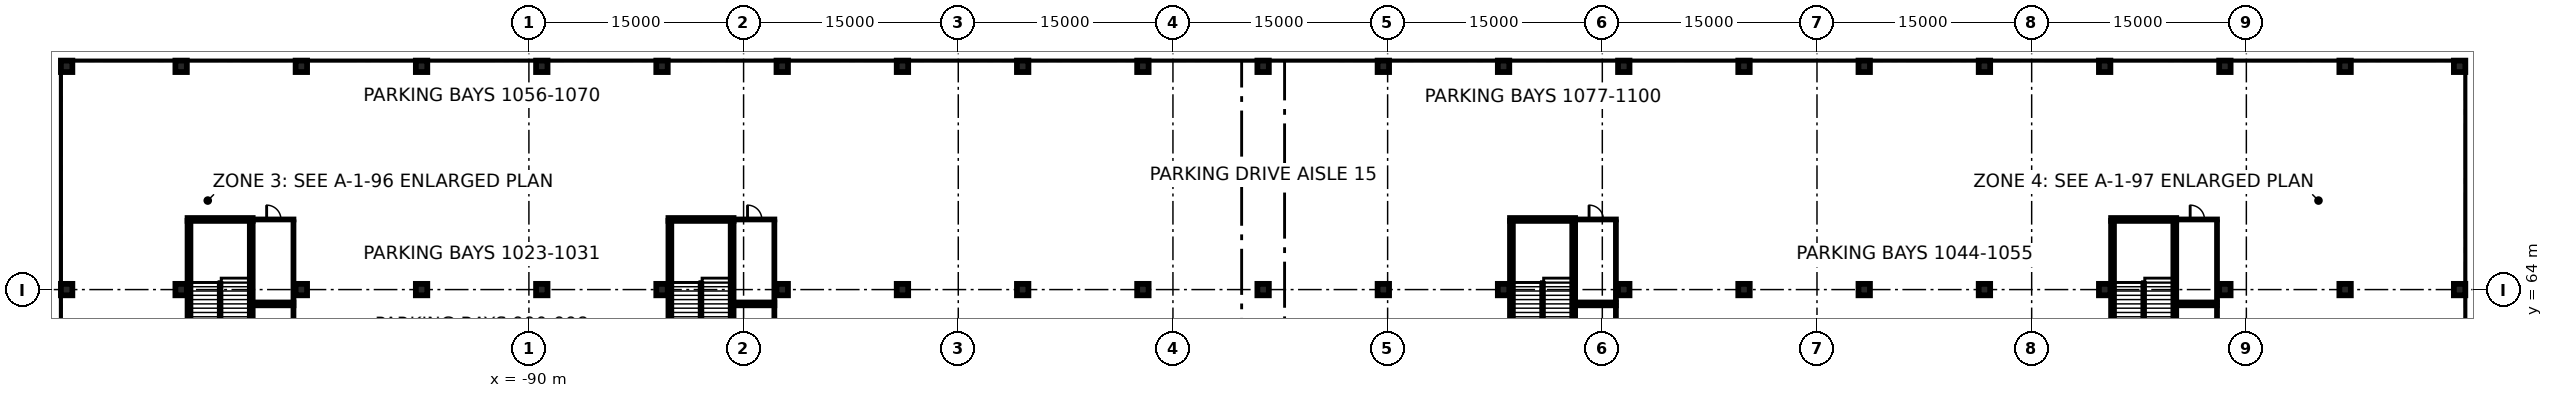
"""IFC4 building model, lengths in metres.
Left out: names, types, materials, properties, quantities, classifications, styles, units other than length and angle.
Written with IfcOpenShell. Run it as: python <this file> out.ifc"""

import sys

from ifc_helpers import new_model, si_unit, direction, frame, frame_2d, origin, origin_2d, place, context, subcontext, project, spatial, rectangle, extrude, element, fill, save


model = new_model("IFC4")
c1 = context("Model", 3, precision=1e-05, world=origin(), true_north=direction((0.0, 1.0)))
c2 = subcontext(c1, "Body", "Model", "MODEL_VIEW")
j1 = project(units=[si_unit("LENGTHUNIT", "METRE"), si_unit("PLANEANGLEUNIT", "RADIAN")], contexts=[c1])
p1 = place(None, origin())
s1 = spatial("IfcSite", under=j1, at=p1, CompositionType="ELEMENT")
p2 = place(p1, origin())
s2 = spatial("IfcBuilding", under=s1, at=p2, CompositionType="ELEMENT")
p3 = place(p2, frame((0.0, 0.0, -12.0)))
s3 = spatial("IfcBuildingStorey", under=s2, at=p3, CompositionType="ELEMENT", Elevation=-12.0)
p4 = place(p3, frame((-123.6, 80.45, 0.0), z_axis=(0.0, 0.0, 1.0), x_axis=(1.0, 0.0, 0.0)))
e1 = element("IfcWall", 1, at=p4, inside=s3, PredefinedType="USERDEFINED", context=c2, shape_type="SweptSolid", body=[
    extrude(rectangle(XDim=169.8, YDim=0.9, at=frame_2d((84.9, 0.0))), origin(), (0.0, 0.0, 1.0), 11.55),
])
for number, where, z_axis, x_axis in (
    (2, (-123.15, -80.0, 0.0), (0.0, 0.0, 1.0), (0.0, 1.0, 0.0)),
    (3, (45.75, -80.0, 0.0), (0.0, 0.0, 1.0), (0.0, 1.0, 0.0)),
):
    element("IfcWall", number, at=place(p3, frame(where, z_axis=z_axis, x_axis=x_axis)), inside=s3, PredefinedType="USERDEFINED", context=c2, shape_type="SweptSolid", body=[
        extrude(rectangle(XDim=160.0, YDim=0.9, at=frame_2d((80.0, 0.0))), origin(), (0.0, 0.0, 1.0), 11.55),
    ])
p5 = place(p2, frame((0.0, 0.0, -7.2)))
s4 = spatial("IfcBuildingStorey", under=s2, at=p5, CompositionType="ELEMENT", Elevation=-7.2)
for number, where, z_axis, x_axis in (
    (4, (-122.3, 64.0, -0.4), (0.0, 0.0, 1.0), (1.0, 0.0, 0.0)),
    (5, (-122.3, 79.6, -0.4), (0.0, 0.0, 1.0), (1.0, 0.0, 0.0)),
    (6, (-114.3, 64.0, -0.4), (0.0, 0.0, 1.0), (1.0, 0.0, 0.0)),
    (7, (-114.3, 79.6, -0.4), (0.0, 0.0, 1.0), (1.0, 0.0, 0.0)),
    (8, (-105.9, 64.0, -0.4), (0.0, 0.0, 1.0), (1.0, 0.0, 0.0)),
    (9, (-105.9, 79.6, -0.4), (0.0, 0.0, 1.0), (1.0, 0.0, 0.0)),
    (10, (-97.5, 64.0, -0.4), (0.0, 0.0, 1.0), (1.0, 0.0, 0.0)),
    (11, (-97.5, 79.6, -0.4), (0.0, 0.0, 1.0), (1.0, 0.0, 0.0)),
    (12, (-89.1, 64.0, -0.4), (0.0, 0.0, 1.0), (1.0, 0.0, 0.0)),
    (13, (-89.1, 79.6, -0.4), (0.0, 0.0, 1.0), (1.0, 0.0, 0.0)),
    (14, (-80.7, 64.0, -0.4), (0.0, 0.0, 1.0), (1.0, 0.0, 0.0)),
    (15, (-80.7, 79.6, -0.4), (0.0, 0.0, 1.0), (1.0, 0.0, 0.0)),
    (16, (-72.3, 64.0, -0.4), (0.0, 0.0, 1.0), (1.0, 0.0, 0.0)),
    (17, (-72.3, 79.6, -0.4), (0.0, 0.0, 1.0), (1.0, 0.0, 0.0)),
    (18, (-63.9, 64.0, -0.4), (0.0, 0.0, 1.0), (1.0, 0.0, 0.0)),
    (19, (-63.9, 79.6, -0.4), (0.0, 0.0, 1.0), (1.0, 0.0, 0.0)),
    (20, (-55.5, 64.0, -0.4), (0.0, 0.0, 1.0), (1.0, 0.0, 0.0)),
    (21, (-55.5, 79.6, -0.4), (0.0, 0.0, 1.0), (1.0, 0.0, 0.0)),
    (22, (-47.1, 64.0, -0.4), (0.0, 0.0, 1.0), (1.0, 0.0, 0.0)),
    (23, (-47.1, 79.6, -0.4), (0.0, 0.0, 1.0), (1.0, 0.0, 0.0)),
    (24, (-38.7, 64.0, -0.4), (0.0, 0.0, 1.0), (1.0, 0.0, 0.0)),
    (25, (-38.7, 79.6, -0.4), (0.0, 0.0, 1.0), (1.0, 0.0, 0.0)),
    (26, (-30.3, 64.0, -0.4), (0.0, 0.0, 1.0), (1.0, 0.0, 0.0)),
    (27, (-30.3, 79.6, -0.4), (0.0, 0.0, 1.0), (1.0, 0.0, 0.0)),
    (28, (-21.9, 64.0, -0.4), (0.0, 0.0, 1.0), (1.0, 0.0, 0.0)),
    (29, (-21.9, 79.6, -0.4), (0.0, 0.0, 1.0), (1.0, 0.0, 0.0)),
    (30, (-13.5, 64.0, -0.4), (0.0, 0.0, 1.0), (1.0, 0.0, 0.0)),
    (31, (-13.5, 79.6, -0.4), (0.0, 0.0, 1.0), (1.0, 0.0, 0.0)),
    (32, (-5.1, 64.0, -0.4), (0.0, 0.0, 1.0), (1.0, 0.0, 0.0)),
    (33, (-5.1, 79.6, -0.4), (0.0, 0.0, 1.0), (1.0, 0.0, 0.0)),
    (34, (3.3, 64.0, -0.4), (0.0, 0.0, 1.0), (1.0, 0.0, 0.0)),
    (35, (3.3, 79.6, -0.4), (0.0, 0.0, 1.0), (1.0, 0.0, 0.0)),
    (36, (11.7, 64.0, -0.4), (0.0, 0.0, 1.0), (1.0, 0.0, 0.0)),
    (37, (11.7, 79.6, -0.4), (0.0, 0.0, 1.0), (1.0, 0.0, 0.0)),
    (38, (20.1, 64.0, -0.4), (0.0, 0.0, 1.0), (1.0, 0.0, 0.0)),
    (39, (20.1, 79.6, -0.4), (0.0, 0.0, 1.0), (1.0, 0.0, 0.0)),
    (40, (28.5, 64.0, -0.4), (0.0, 0.0, 1.0), (1.0, 0.0, 0.0)),
    (41, (28.5, 79.6, -0.4), (0.0, 0.0, 1.0), (1.0, 0.0, 0.0)),
    (42, (36.9, 64.0, -0.4), (0.0, 0.0, 1.0), (1.0, 0.0, 0.0)),
    (43, (36.9, 79.6, -0.4), (0.0, 0.0, 1.0), (1.0, 0.0, 0.0)),
    (44, (44.9, 64.0, -0.4), (0.0, 0.0, 1.0), (1.0, 0.0, 0.0)),
    (45, (44.9, 79.6, -0.4), (0.0, 0.0, 1.0), (1.0, 0.0, 0.0)),
):
    element("IfcColumn", number, at=place(p5, frame(where, z_axis=z_axis, x_axis=x_axis)), inside=s4, PredefinedType="COLUMN", context=c2, shape_type="SweptSolid", body=[
        extrude(rectangle(XDim=0.8, YDim=0.8, at=origin_2d()), origin(), (0.0, 0.0, 1.0), 3.6),
    ])
p6 = place(p5, frame((-109.3, 62.9, 0.0), z_axis=(0.0, 0.0, 1.0), x_axis=(1.0, 0.0, 0.0)))
e46 = element("IfcWall", 46, at=p6, inside=s4, PredefinedType="PARTITIONING", context=c2, shape_type="SweptSolid", body=[
    extrude(rectangle(XDim=2.95, YDim=0.2, at=frame_2d((1.475, 0.0))), origin(), (0.0, 0.0, 1.0), 3.2),
])
p7 = place(p5, frame((-106.45, 59.2, 0.0), z_axis=(0.0, 0.0, 1.0), x_axis=(0.0, 1.0, 0.0)))
e47 = element("IfcWall", 47, at=p7, inside=s4, PredefinedType="PARTITIONING", context=c2, shape_type="SweptSolid", body=[
    extrude(rectangle(XDim=3.6, YDim=0.2, at=frame_2d((1.8, 0.0))), origin(), (0.0, 0.0, 1.0), 3.2),
])
p8 = place(p5, frame((-109.3, 63.1, 0.0), z_axis=(0.0, 0.0, 1.0), x_axis=(1.0, 0.0, 0.0)))
e48 = element("IfcWall", 48, at=p8, inside=s4, PredefinedType="PARTITIONING", context=c2, shape_type="SweptSolid", body=[
    extrude(rectangle(XDim=2.95, YDim=0.2, at=frame_2d((1.475, 0.0))), origin(), (0.0, 0.0, 1.0), 3.2),
])
p9 = place(p5, frame((-109.3, 68.9, 0.0), z_axis=(0.0, 0.0, 1.0), x_axis=(1.0, 0.0, 0.0)))
e49 = element("IfcWall", 49, at=p9, inside=s4, PredefinedType="PARTITIONING", context=c2, shape_type="SweptSolid", body=[
    extrude(rectangle(XDim=2.95, YDim=0.2, at=frame_2d((1.475, 0.0))), origin(), (0.0, 0.0, 1.0), 3.2),
])
p10 = place(p9, frame((0.975, 0.0, 0.0)))
e50 = element("IfcOpeningElement", 50, at=p10, cuts=e49, PredefinedType="OPENING", context=c2, shape_type="SweptSolid", body=[
    extrude(rectangle(XDim=1.0, YDim=2.1, at=frame_2d((0.5, 1.05))), frame((0.0, 0.11, 0.0), z_axis=(0.0, -1.0, 0.0), x_axis=(1.0, 0.0, 0.0)), (0.0, 0.0, 1.0), 0.22),
])
p11 = place(p5, frame((-106.45, 63.2, 0.0), z_axis=(0.0, 0.0, 1.0), x_axis=(0.0, 1.0, 0.0)))
e51 = element("IfcWall", 51, at=p11, inside=s4, PredefinedType="PARTITIONING", context=c2, shape_type="SweptSolid", body=[
    extrude(rectangle(XDim=5.6, YDim=0.2, at=frame_2d((2.8, 0.0))), origin(), (0.0, 0.0, 1.0), 3.2),
])
p12 = place(p5, frame((-75.7, 62.9, 0.0), z_axis=(0.0, 0.0, 1.0), x_axis=(1.0, 0.0, 0.0)))
e52 = element("IfcWall", 52, at=p12, inside=s4, PredefinedType="PARTITIONING", context=c2, shape_type="SweptSolid", body=[
    extrude(rectangle(XDim=2.95, YDim=0.2, at=frame_2d((1.475, 0.0))), origin(), (0.0, 0.0, 1.0), 3.2),
])
p13 = place(p5, frame((-72.85, 59.2, 0.0), z_axis=(0.0, 0.0, 1.0), x_axis=(0.0, 1.0, 0.0)))
e53 = element("IfcWall", 53, at=p13, inside=s4, PredefinedType="PARTITIONING", context=c2, shape_type="SweptSolid", body=[
    extrude(rectangle(XDim=3.6, YDim=0.2, at=frame_2d((1.8, 0.0))), origin(), (0.0, 0.0, 1.0), 3.2),
])
p14 = place(p5, frame((-75.7, 63.1, 0.0), z_axis=(0.0, 0.0, 1.0), x_axis=(1.0, 0.0, 0.0)))
e54 = element("IfcWall", 54, at=p14, inside=s4, PredefinedType="PARTITIONING", context=c2, shape_type="SweptSolid", body=[
    extrude(rectangle(XDim=2.95, YDim=0.2, at=frame_2d((1.475, 0.0))), origin(), (0.0, 0.0, 1.0), 3.2),
])
p15 = place(p5, frame((-75.7, 68.9, 0.0), z_axis=(0.0, 0.0, 1.0), x_axis=(1.0, 0.0, 0.0)))
e55 = element("IfcWall", 55, at=p15, inside=s4, PredefinedType="PARTITIONING", context=c2, shape_type="SweptSolid", body=[
    extrude(rectangle(XDim=2.95, YDim=0.2, at=frame_2d((1.475, 0.0))), origin(), (0.0, 0.0, 1.0), 3.2),
])
p16 = place(p15, frame((0.975, 0.0, 0.0)))
e56 = element("IfcOpeningElement", 56, at=p16, cuts=e55, PredefinedType="OPENING", context=c2, shape_type="SweptSolid", body=[
    extrude(rectangle(XDim=1.0, YDim=2.1, at=frame_2d((0.5, 1.05))), frame((0.0, 0.11, 0.0), z_axis=(0.0, -1.0, 0.0), x_axis=(1.0, 0.0, 0.0)), (0.0, 0.0, 1.0), 0.22),
])
p17 = place(p5, frame((-72.85, 63.2, 0.0), z_axis=(0.0, 0.0, 1.0), x_axis=(0.0, 1.0, 0.0)))
e57 = element("IfcWall", 57, at=p17, inside=s4, PredefinedType="PARTITIONING", context=c2, shape_type="SweptSolid", body=[
    extrude(rectangle(XDim=5.6, YDim=0.2, at=frame_2d((2.8, 0.0))), origin(), (0.0, 0.0, 1.0), 3.2),
])
p18 = place(p5, frame((-16.9, 62.9, 0.0), z_axis=(0.0, 0.0, 1.0), x_axis=(1.0, 0.0, 0.0)))
e58 = element("IfcWall", 58, at=p18, inside=s4, PredefinedType="PARTITIONING", context=c2, shape_type="SweptSolid", body=[
    extrude(rectangle(XDim=2.95, YDim=0.2, at=frame_2d((1.475, 0.0))), origin(), (0.0, 0.0, 1.0), 3.2),
])
p19 = place(p5, frame((-14.05, 59.2, 0.0), z_axis=(0.0, 0.0, 1.0), x_axis=(0.0, 1.0, 0.0)))
e59 = element("IfcWall", 59, at=p19, inside=s4, PredefinedType="PARTITIONING", context=c2, shape_type="SweptSolid", body=[
    extrude(rectangle(XDim=3.6, YDim=0.2, at=frame_2d((1.8, 0.0))), origin(), (0.0, 0.0, 1.0), 3.2),
])
p20 = place(p5, frame((-16.9, 63.1, 0.0), z_axis=(0.0, 0.0, 1.0), x_axis=(1.0, 0.0, 0.0)))
e60 = element("IfcWall", 60, at=p20, inside=s4, PredefinedType="PARTITIONING", context=c2, shape_type="SweptSolid", body=[
    extrude(rectangle(XDim=2.95, YDim=0.2, at=frame_2d((1.475, 0.0))), origin(), (0.0, 0.0, 1.0), 3.2),
])
p21 = place(p5, frame((-16.9, 68.9, 0.0), z_axis=(0.0, 0.0, 1.0), x_axis=(1.0, 0.0, 0.0)))
e61 = element("IfcWall", 61, at=p21, inside=s4, PredefinedType="PARTITIONING", context=c2, shape_type="SweptSolid", body=[
    extrude(rectangle(XDim=2.95, YDim=0.2, at=frame_2d((1.475, 0.0))), origin(), (0.0, 0.0, 1.0), 3.2),
])
p22 = place(p21, frame((0.975, 0.0, 0.0)))
e62 = element("IfcOpeningElement", 62, at=p22, cuts=e61, PredefinedType="OPENING", context=c2, shape_type="SweptSolid", body=[
    extrude(rectangle(XDim=1.0, YDim=2.1, at=frame_2d((0.5, 1.05))), frame((0.0, 0.11, 0.0), z_axis=(0.0, -1.0, 0.0), x_axis=(1.0, 0.0, 0.0)), (0.0, 0.0, 1.0), 0.22),
])
p23 = place(p5, frame((-14.05, 63.2, 0.0), z_axis=(0.0, 0.0, 1.0), x_axis=(0.0, 1.0, 0.0)))
e63 = element("IfcWall", 63, at=p23, inside=s4, PredefinedType="PARTITIONING", context=c2, shape_type="SweptSolid", body=[
    extrude(rectangle(XDim=5.6, YDim=0.2, at=frame_2d((2.8, 0.0))), origin(), (0.0, 0.0, 1.0), 3.2),
])
p24 = place(p5, frame((25.1, 62.9, 0.0), z_axis=(0.0, 0.0, 1.0), x_axis=(1.0, 0.0, 0.0)))
e64 = element("IfcWall", 64, at=p24, inside=s4, PredefinedType="PARTITIONING", context=c2, shape_type="SweptSolid", body=[
    extrude(rectangle(XDim=2.95, YDim=0.2, at=frame_2d((1.475, 0.0))), origin(), (0.0, 0.0, 1.0), 3.2),
])
p25 = place(p5, frame((27.95, 59.2, 0.0), z_axis=(0.0, 0.0, 1.0), x_axis=(0.0, 1.0, 0.0)))
e65 = element("IfcWall", 65, at=p25, inside=s4, PredefinedType="PARTITIONING", context=c2, shape_type="SweptSolid", body=[
    extrude(rectangle(XDim=3.6, YDim=0.2, at=frame_2d((1.8, 0.0))), origin(), (0.0, 0.0, 1.0), 3.2),
])
p26 = place(p5, frame((25.1, 63.1, 0.0), z_axis=(0.0, 0.0, 1.0), x_axis=(1.0, 0.0, 0.0)))
e66 = element("IfcWall", 66, at=p26, inside=s4, PredefinedType="PARTITIONING", context=c2, shape_type="SweptSolid", body=[
    extrude(rectangle(XDim=2.95, YDim=0.2, at=frame_2d((1.475, 0.0))), origin(), (0.0, 0.0, 1.0), 3.2),
])
p27 = place(p5, frame((25.1, 68.9, 0.0), z_axis=(0.0, 0.0, 1.0), x_axis=(1.0, 0.0, 0.0)))
e67 = element("IfcWall", 67, at=p27, inside=s4, PredefinedType="PARTITIONING", context=c2, shape_type="SweptSolid", body=[
    extrude(rectangle(XDim=2.95, YDim=0.2, at=frame_2d((1.475, 0.0))), origin(), (0.0, 0.0, 1.0), 3.2),
])
p28 = place(p27, frame((0.975, 0.0, 0.0)))
e68 = element("IfcOpeningElement", 68, at=p28, cuts=e67, PredefinedType="OPENING", context=c2, shape_type="SweptSolid", body=[
    extrude(rectangle(XDim=1.0, YDim=2.1, at=frame_2d((0.5, 1.05))), frame((0.0, 0.11, 0.0), z_axis=(0.0, -1.0, 0.0), x_axis=(1.0, 0.0, 0.0)), (0.0, 0.0, 1.0), 0.22),
])
p29 = place(p5, frame((27.95, 63.2, 0.0), z_axis=(0.0, 0.0, 1.0), x_axis=(0.0, 1.0, 0.0)))
e69 = element("IfcWall", 69, at=p29, inside=s4, PredefinedType="PARTITIONING", context=c2, shape_type="SweptSolid", body=[
    extrude(rectangle(XDim=5.6, YDim=0.2, at=frame_2d((2.8, 0.0))), origin(), (0.0, 0.0, 1.0), 3.2),
])
p30 = place(p5, frame((-113.75, 59.2, 0.0), z_axis=(0.0, 0.0, 1.0), x_axis=(0.0, 1.0, 0.0)))
e70 = element("IfcWall", 70, at=p30, inside=s4, PredefinedType="SOLIDWALL", context=c2, shape_type="SweptSolid", body=[
    extrude(rectangle(XDim=9.6, YDim=0.2, at=frame_2d((4.8, 0.0))), origin(), (0.0, 0.0, 1.0), 3.2),
])
p31 = place(p5, frame((-109.4, 59.2, 0.0), z_axis=(0.0, 0.0, 1.0), x_axis=(0.0, 1.0, 0.0)))
e71 = element("IfcWall", 71, at=p31, inside=s4, PredefinedType="SOLIDWALL", context=c2, shape_type="SweptSolid", body=[
    extrude(rectangle(XDim=9.6, YDim=0.2, at=frame_2d((4.8, 0.0))), origin(), (0.0, 0.0, 1.0), 3.2),
])
p32 = place(p31, frame((0.4, 0.0, 0.0)))
e72 = element("IfcOpeningElement", 72, at=p32, cuts=e71, PredefinedType="OPENING", context=c2, shape_type="SweptSolid", body=[
    extrude(rectangle(XDim=1.2, YDim=2.1, at=frame_2d((0.6, 1.05))), frame((0.0, 0.11, 0.0), z_axis=(0.0, -1.0, 0.0), x_axis=(1.0, 0.0, 0.0)), (0.0, 0.0, 1.0), 0.22),
])
p33 = place(p5, frame((-113.85, 68.9, 0.0), z_axis=(0.0, 0.0, 1.0), x_axis=(1.0, 0.0, 0.0)))
e73 = element("IfcWall", 73, at=p33, inside=s4, PredefinedType="SOLIDWALL", context=c2, shape_type="SweptSolid", body=[
    extrude(rectangle(XDim=4.55, YDim=0.2, at=frame_2d((2.275, 0.0))), origin(), (0.0, 0.0, 1.0), 3.2),
])
p34 = place(p5, frame((-80.15, 59.2, 0.0), z_axis=(0.0, 0.0, 1.0), x_axis=(0.0, 1.0, 0.0)))
e74 = element("IfcWall", 74, at=p34, inside=s4, PredefinedType="SOLIDWALL", context=c2, shape_type="SweptSolid", body=[
    extrude(rectangle(XDim=9.6, YDim=0.2, at=frame_2d((4.8, 0.0))), origin(), (0.0, 0.0, 1.0), 3.2),
])
p35 = place(p5, frame((-75.8, 59.2, 0.0), z_axis=(0.0, 0.0, 1.0), x_axis=(0.0, 1.0, 0.0)))
e75 = element("IfcWall", 75, at=p35, inside=s4, PredefinedType="SOLIDWALL", context=c2, shape_type="SweptSolid", body=[
    extrude(rectangle(XDim=9.6, YDim=0.2, at=frame_2d((4.8, 0.0))), origin(), (0.0, 0.0, 1.0), 3.2),
])
p36 = place(p35, frame((0.4, 0.0, 0.0)))
e76 = element("IfcOpeningElement", 76, at=p36, cuts=e75, PredefinedType="OPENING", context=c2, shape_type="SweptSolid", body=[
    extrude(rectangle(XDim=1.2, YDim=2.1, at=frame_2d((0.6, 1.05))), frame((0.0, 0.11, 0.0), z_axis=(0.0, -1.0, 0.0), x_axis=(1.0, 0.0, 0.0)), (0.0, 0.0, 1.0), 0.22),
])
p37 = place(p5, frame((-80.25, 68.9, 0.0), z_axis=(0.0, 0.0, 1.0), x_axis=(1.0, 0.0, 0.0)))
e77 = element("IfcWall", 77, at=p37, inside=s4, PredefinedType="SOLIDWALL", context=c2, shape_type="SweptSolid", body=[
    extrude(rectangle(XDim=4.55, YDim=0.2, at=frame_2d((2.275, 0.0))), origin(), (0.0, 0.0, 1.0), 3.2),
])
p38 = place(p5, frame((-21.35, 59.2, 0.0), z_axis=(0.0, 0.0, 1.0), x_axis=(0.0, 1.0, 0.0)))
e78 = element("IfcWall", 78, at=p38, inside=s4, PredefinedType="SOLIDWALL", context=c2, shape_type="SweptSolid", body=[
    extrude(rectangle(XDim=9.6, YDim=0.2, at=frame_2d((4.8, 0.0))), origin(), (0.0, 0.0, 1.0), 3.2),
])
p39 = place(p5, frame((-17.0, 59.2, 0.0), z_axis=(0.0, 0.0, 1.0), x_axis=(0.0, 1.0, 0.0)))
e79 = element("IfcWall", 79, at=p39, inside=s4, PredefinedType="SOLIDWALL", context=c2, shape_type="SweptSolid", body=[
    extrude(rectangle(XDim=9.6, YDim=0.2, at=frame_2d((4.8, 0.0))), origin(), (0.0, 0.0, 1.0), 3.2),
])
p40 = place(p39, frame((0.4, 0.0, 0.0)))
e80 = element("IfcOpeningElement", 80, at=p40, cuts=e79, PredefinedType="OPENING", context=c2, shape_type="SweptSolid", body=[
    extrude(rectangle(XDim=1.2, YDim=2.1, at=frame_2d((0.6, 1.05))), frame((0.0, 0.11, 0.0), z_axis=(0.0, -1.0, 0.0), x_axis=(1.0, 0.0, 0.0)), (0.0, 0.0, 1.0), 0.22),
])
p41 = place(p5, frame((-21.45, 68.9, 0.0), z_axis=(0.0, 0.0, 1.0), x_axis=(1.0, 0.0, 0.0)))
e81 = element("IfcWall", 81, at=p41, inside=s4, PredefinedType="SOLIDWALL", context=c2, shape_type="SweptSolid", body=[
    extrude(rectangle(XDim=4.55, YDim=0.2, at=frame_2d((2.275, 0.0))), origin(), (0.0, 0.0, 1.0), 3.2),
])
p42 = place(p5, frame((20.65, 59.2, 0.0), z_axis=(0.0, 0.0, 1.0), x_axis=(0.0, 1.0, 0.0)))
e82 = element("IfcWall", 82, at=p42, inside=s4, PredefinedType="SOLIDWALL", context=c2, shape_type="SweptSolid", body=[
    extrude(rectangle(XDim=9.6, YDim=0.2, at=frame_2d((4.8, 0.0))), origin(), (0.0, 0.0, 1.0), 3.2),
])
p43 = place(p5, frame((25.0, 59.2, 0.0), z_axis=(0.0, 0.0, 1.0), x_axis=(0.0, 1.0, 0.0)))
e83 = element("IfcWall", 83, at=p43, inside=s4, PredefinedType="SOLIDWALL", context=c2, shape_type="SweptSolid", body=[
    extrude(rectangle(XDim=9.6, YDim=0.2, at=frame_2d((4.8, 0.0))), origin(), (0.0, 0.0, 1.0), 3.2),
])
p44 = place(p43, frame((0.4, 0.0, 0.0)))
e84 = element("IfcOpeningElement", 84, at=p44, cuts=e83, PredefinedType="OPENING", context=c2, shape_type="SweptSolid", body=[
    extrude(rectangle(XDim=1.2, YDim=2.1, at=frame_2d((0.6, 1.05))), frame((0.0, 0.11, 0.0), z_axis=(0.0, -1.0, 0.0), x_axis=(1.0, 0.0, 0.0)), (0.0, 0.0, 1.0), 0.22),
])
p45 = place(p5, frame((20.55, 68.9, 0.0), z_axis=(0.0, 0.0, 1.0), x_axis=(1.0, 0.0, 0.0)))
e85 = element("IfcWall", 85, at=p45, inside=s4, PredefinedType="SOLIDWALL", context=c2, shape_type="SweptSolid", body=[
    extrude(rectangle(XDim=4.55, YDim=0.2, at=frame_2d((2.275, 0.0))), origin(), (0.0, 0.0, 1.0), 3.2),
])
p46 = place(p10, origin())
e86 = element("IfcDoor", 86, at=p46, inside=s4, OperationType="SINGLE_SWING_LEFT", PredefinedType="DOOR", context=c2, shape_type="SweptSolid", body=[
    extrude(rectangle(XDim=1.0, YDim=2.1, at=frame_2d((0.5, 1.05))), frame((0.0, 0.025, 0.0), z_axis=(0.0, -1.0, 0.0), x_axis=(1.0, 0.0, 0.0)), (0.0, 0.0, 1.0), 0.05),
])
fill(e50, e86)
p47 = place(p16, origin())
e87 = element("IfcDoor", 87, at=p47, inside=s4, OperationType="SINGLE_SWING_LEFT", PredefinedType="DOOR", context=c2, shape_type="SweptSolid", body=[
    extrude(rectangle(XDim=1.0, YDim=2.1, at=frame_2d((0.5, 1.05))), frame((0.0, 0.025, 0.0), z_axis=(0.0, -1.0, 0.0), x_axis=(1.0, 0.0, 0.0)), (0.0, 0.0, 1.0), 0.05),
])
fill(e56, e87)
p48 = place(p22, origin())
e88 = element("IfcDoor", 88, at=p48, inside=s4, OperationType="SINGLE_SWING_LEFT", PredefinedType="DOOR", context=c2, shape_type="SweptSolid", body=[
    extrude(rectangle(XDim=1.0, YDim=2.1, at=frame_2d((0.5, 1.05))), frame((0.0, 0.025, 0.0), z_axis=(0.0, -1.0, 0.0), x_axis=(1.0, 0.0, 0.0)), (0.0, 0.0, 1.0), 0.05),
])
fill(e62, e88)
p49 = place(p28, origin())
e89 = element("IfcDoor", 89, at=p49, inside=s4, OperationType="SINGLE_SWING_LEFT", PredefinedType="DOOR", context=c2, shape_type="SweptSolid", body=[
    extrude(rectangle(XDim=1.0, YDim=2.1, at=frame_2d((0.5, 1.05))), frame((0.0, 0.025, 0.0), z_axis=(0.0, -1.0, 0.0), x_axis=(1.0, 0.0, 0.0)), (0.0, 0.0, 1.0), 0.05),
])
fill(e68, e89)
save(model, sys.argv[1])
